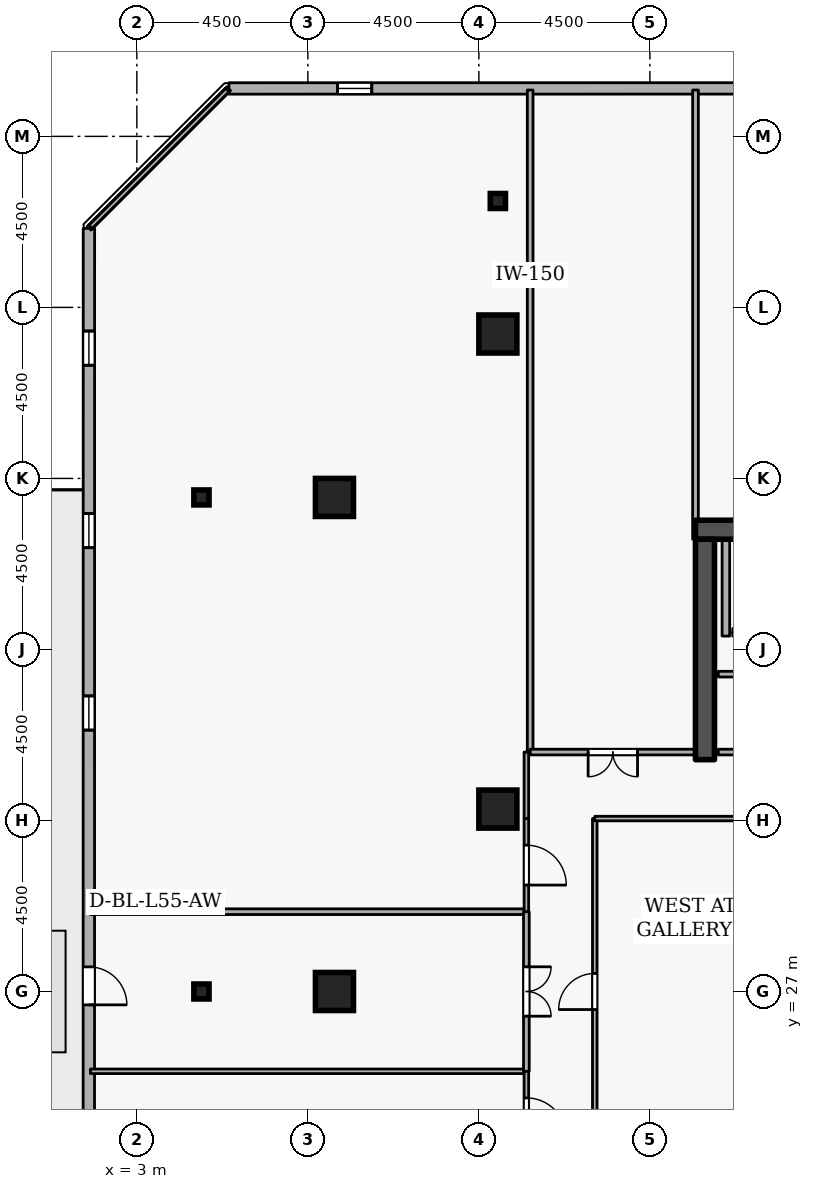
"""IFC4 building model, lengths in metres.
Left out: names, types, materials, properties, quantities, classifications, styles, units other than length and angle.
Written with IfcOpenShell. Run it as: python <this file> out.ifc"""

import sys

from ifc_helpers import new_model, si_unit, direction, frame, frame_2d, origin, origin_2d, place, context, subcontext, project, spatial, rectangle, i_section, extrude, element, fill, save


model = new_model("IFC4")
c1 = context("Model", 3, precision=1e-05, world=origin(), true_north=direction((0.0, 1.0)))
c2 = subcontext(c1, "Body", "Model", "MODEL_VIEW")
j1 = project(units=[si_unit("LENGTHUNIT", "METRE"), si_unit("PLANEANGLEUNIT", "RADIAN")], contexts=[c1])
p1 = place(None, origin())
s1 = spatial("IfcSite", under=j1, at=p1, CompositionType="ELEMENT")
p2 = place(p1, origin())
s2 = spatial("IfcBuilding", under=s1, at=p2, CompositionType="ELEMENT")
p3 = place(p2, frame((0.0, 0.0, 207.3)))
s3 = spatial("IfcBuildingStorey", under=s2, at=p3, CompositionType="ELEMENT", Elevation=207.3)
p4 = place(p3, frame((17.7, 39.15, 0.0), z_axis=(0.0, 0.0, 1.0), x_axis=(1.0, 0.0, 0.0)))
e1 = element("IfcWall", 1, at=p4, inside=s3, PredefinedType="SHEAR", context=c2, shape_type="SweptSolid", body=[
    extrude(rectangle(XDim=15.6, YDim=0.5, at=frame_2d((7.8, 0.0))), origin(), (0.0, 0.0, 1.0), 3.6),
])
p5 = place(p3, frame((17.95, 33.1, 0.0), z_axis=(0.0, 0.0, 1.0), x_axis=(0.0, 1.0, 0.0)))
e2 = element("IfcWall", 2, at=p5, inside=s3, PredefinedType="SHEAR", context=c2, shape_type="SweptSolid", body=[
    extrude(rectangle(XDim=5.8, YDim=0.5, at=frame_2d((2.9, 0.0))), origin(), (0.0, 0.0, 1.0), 3.6),
])
for number, where, z_axis, x_axis in (
    (3, (12.5, 44.3, 0.0), (0.0, 0.0, 1.0), (1.0, 0.0, 0.0)),
    (4, (8.2, 27.0, 0.0), (0.0, 0.0, 1.0), (1.0, 0.0, 0.0)),
    (5, (8.2, 40.0, 0.0), (0.0, 0.0, 1.0), (1.0, 0.0, 0.0)),
    (6, (12.5, 31.8, 0.0), (0.0, 0.0, 1.0), (1.0, 0.0, 0.0)),
):
    element("IfcColumn", number, at=place(p3, frame(where, z_axis=z_axis, x_axis=x_axis)), inside=s3, PredefinedType="COLUMN", context=c2, shape_type="SweptSolid", body=[
        extrude(rectangle(XDim=1.0, YDim=1.0, at=origin_2d()), origin(), (0.0, 0.0, 1.0), 3.6),
    ])
for number, where, z_axis, x_axis in (
    (7, (12.5, 47.8, 0.0), (0.0, 0.0, 1.0), (1.0, 0.0, 0.0)),
    (8, (4.7, 27.0, 0.0), (0.0, 0.0, 1.0), (1.0, 0.0, 0.0)),
    (9, (4.7, 40.0, 0.0), (0.0, 0.0, 1.0), (1.0, 0.0, 0.0)),
):
    element("IfcColumn", number, at=place(p3, frame(where, z_axis=z_axis, x_axis=x_axis)), inside=s3, PredefinedType="COLUMN", context=c2, shape_type="SweptSolid", body=[
        extrude(i_section(OverallWidth=0.399, OverallDepth=0.394, WebThickness=0.023, FlangeThickness=0.037, FilletRadius=0.015, at=origin_2d()), origin(), (0.0, 0.0, 1.0), 3.6),
    ])
p6 = place(p3, frame((40.681, 50.765, 0.0), z_axis=(0.0, 0.0, 1.0), x_axis=(-0.999999994606, -0.000103863011, 0.0)))
e10 = element("IfcWall", 10, at=p6, inside=s3, PredefinedType="STANDARD", context=c2, shape_type="SweptSolid", body=[
    extrude(rectangle(XDim=35.259, YDim=0.3, at=frame_2d((17.629, 0.0))), origin(), (0.0, 0.0, 1.0), 2.7),
])
p7 = place(p6, frame((2.7, 0.0, 0.72)))
e11 = element("IfcOpeningElement", 11, at=p7, cuts=e10, PredefinedType="OPENING", context=c2, shape_type="SweptSolid", body=[
    extrude(rectangle(XDim=0.9, YDim=1.75, at=frame_2d((0.45, 0.875))), frame((0.0, 0.16, 0.0), z_axis=(0.0, -1.0, 0.0), x_axis=(1.0, 0.0, 0.0)), (0.0, 0.0, 1.0), 0.32),
])
p8 = place(p6, frame((7.5, 0.0, 0.72)))
e12 = element("IfcOpeningElement", 12, at=p8, cuts=e10, PredefinedType="OPENING", context=c2, shape_type="SweptSolid", body=[
    extrude(rectangle(XDim=0.9, YDim=1.75, at=frame_2d((0.45, 0.875))), frame((0.0, 0.16, 0.0), z_axis=(0.0, -1.0, 0.0), x_axis=(1.0, 0.0, 0.0)), (0.0, 0.0, 1.0), 0.32),
])
p9 = place(p6, frame((12.3, 0.0, 0.72)))
e13 = element("IfcOpeningElement", 13, at=p9, cuts=e10, PredefinedType="OPENING", context=c2, shape_type="SweptSolid", body=[
    extrude(rectangle(XDim=0.9, YDim=1.75, at=frame_2d((0.45, 0.875))), frame((0.0, 0.16, 0.0), z_axis=(0.0, -1.0, 0.0), x_axis=(1.0, 0.0, 0.0)), (0.0, 0.0, 1.0), 0.32),
])
p10 = place(p6, frame((17.1, 0.0, 0.72)))
e14 = element("IfcOpeningElement", 14, at=p10, cuts=e10, PredefinedType="OPENING", context=c2, shape_type="SweptSolid", body=[
    extrude(rectangle(XDim=0.9, YDim=1.75, at=frame_2d((0.45, 0.875))), frame((0.0, 0.16, 0.0), z_axis=(0.0, -1.0, 0.0), x_axis=(1.0, 0.0, 0.0)), (0.0, 0.0, 1.0), 0.32),
])
p11 = place(p6, frame((31.5, 0.0, 0.72)))
e15 = element("IfcOpeningElement", 15, at=p11, cuts=e10, PredefinedType="OPENING", context=c2, shape_type="SweptSolid", body=[
    extrude(rectangle(XDim=0.9, YDim=1.75, at=frame_2d((0.45, 0.875))), frame((0.0, 0.16, 0.0), z_axis=(0.0, -1.0, 0.0), x_axis=(1.0, 0.0, 0.0)), (0.0, 0.0, 1.0), 0.32),
])
p12 = place(p3, frame((1.739, 47.078, 0.0), z_axis=(0.0, 0.0, 1.0), x_axis=(-0.000103863011, -0.999999994606, 0.0)))
e16 = element("IfcWall", 16, at=p12, inside=s3, PredefinedType="STANDARD", context=c2, shape_type="SweptSolid", body=[
    extrude(rectangle(XDim=35.259, YDim=0.3, at=frame_2d((17.629, 0.0))), origin(), (0.0, 0.0, 1.0), 2.7),
])
p13 = place(p12, frame((19.43, 0.0, 0.0)))
e17 = element("IfcOpeningElement", 17, at=p13, cuts=e16, PredefinedType="OPENING", context=c2, shape_type="SweptSolid", body=[
    extrude(rectangle(XDim=1.0, YDim=2.08, at=frame_2d((0.5, 1.04))), frame((0.0, 0.16, 0.0), z_axis=(0.0, -1.0, 0.0), x_axis=(1.0, 0.0, 0.0)), (0.0, 0.0, 1.0), 0.32),
])
p14 = place(p12, frame((2.7, 0.0, 0.72)))
e18 = element("IfcOpeningElement", 18, at=p14, cuts=e16, PredefinedType="OPENING", context=c2, shape_type="SweptSolid", body=[
    extrude(rectangle(XDim=0.9, YDim=1.75, at=frame_2d((0.45, 0.875))), frame((0.0, 0.16, 0.0), z_axis=(0.0, -1.0, 0.0), x_axis=(1.0, 0.0, 0.0)), (0.0, 0.0, 1.0), 0.32),
])
p15 = place(p12, frame((7.5, 0.0, 0.72)))
e19 = element("IfcOpeningElement", 19, at=p15, cuts=e16, PredefinedType="OPENING", context=c2, shape_type="SweptSolid", body=[
    extrude(rectangle(XDim=0.9, YDim=1.75, at=frame_2d((0.45, 0.875))), frame((0.0, 0.16, 0.0), z_axis=(0.0, -1.0, 0.0), x_axis=(1.0, 0.0, 0.0)), (0.0, 0.0, 1.0), 0.32),
])
p16 = place(p12, frame((12.3, 0.0, 0.72)))
e20 = element("IfcOpeningElement", 20, at=p16, cuts=e16, PredefinedType="OPENING", context=c2, shape_type="SweptSolid", body=[
    extrude(rectangle(XDim=0.9, YDim=1.75, at=frame_2d((0.45, 0.875))), frame((0.0, 0.16, 0.0), z_axis=(0.0, -1.0, 0.0), x_axis=(1.0, 0.0, 0.0)), (0.0, 0.0, 1.0), 0.32),
])
p17 = place(p12, frame((26.7, 0.0, 0.72)))
e21 = element("IfcOpeningElement", 21, at=p17, cuts=e16, PredefinedType="OPENING", context=c2, shape_type="SweptSolid", body=[
    extrude(rectangle(XDim=0.9, YDim=1.75, at=frame_2d((0.45, 0.875))), frame((0.0, 0.16, 0.0), z_axis=(0.0, -1.0, 0.0), x_axis=(1.0, 0.0, 0.0)), (0.0, 0.0, 1.0), 0.32),
])
p18 = place(p12, frame((31.5, 0.0, 0.72)))
e22 = element("IfcOpeningElement", 22, at=p18, cuts=e16, PredefinedType="OPENING", context=c2, shape_type="SweptSolid", body=[
    extrude(rectangle(XDim=0.9, YDim=1.75, at=frame_2d((0.45, 0.875))), frame((0.0, 0.16, 0.0), z_axis=(0.0, -1.0, 0.0), x_axis=(1.0, 0.0, 0.0)), (0.0, 0.0, 1.0), 0.32),
])
p19 = place(p3, frame((20.62, 36.45, 0.0), z_axis=(0.0, 0.0, 1.0), x_axis=(-1.0, 0.0, 0.0)))
e23 = element("IfcWall", 23, at=p19, inside=s3, PredefinedType="STANDARD", context=c2, shape_type="SweptSolid", body=[
    extrude(rectangle(XDim=1.94, YDim=0.2, at=frame_2d((0.97, 0.0))), origin(), (0.0, 0.0, 1.0), 3.34),
])
p20 = place(p19, frame((0.46, 0.0, 0.0)))
e24 = element("IfcOpeningElement", 24, at=p20, cuts=e23, PredefinedType="OPENING", context=c2, shape_type="SweptSolid", body=[
    extrude(rectangle(XDim=1.02, YDim=2.06, at=frame_2d((0.51, 1.03))), frame((0.0, 0.11, 0.0), z_axis=(0.0, -1.0, 0.0), x_axis=(1.0, 0.0, 0.0)), (0.0, 0.0, 1.0), 0.22),
])
p21 = place(p3, frame((18.5, 36.352, 0.0), z_axis=(0.0, 0.0, 1.0), x_axis=(0.0, 1.0, 0.0)))
e25 = element("IfcWall", 25, at=p21, inside=s3, PredefinedType="STANDARD", context=c2, shape_type="SweptSolid", body=[
    extrude(rectangle(XDim=2.536, YDim=0.2, at=frame_2d((1.268, 0.0))), origin(), (0.0, 0.0, 1.0), 3.34),
])
p22 = place(p3, frame((18.3, 35.35, 0.0), z_axis=(0.0, 0.0, 1.0), x_axis=(1.0, 0.0, 0.0)))
e26 = element("IfcWall", 26, at=p22, inside=s3, PredefinedType="PARTITIONING", context=c2, shape_type="SweptSolid", body=[
    extrude(rectangle(XDim=4.25, YDim=0.15, at=frame_2d((2.125, 0.0))), origin(), (0.0, 0.0, 1.0), 3.34),
])
p23 = place(p3, frame((22.55, 33.3, 0.0), z_axis=(0.0, 0.0, 1.0), x_axis=(-1.0, 0.0, 0.0)))
e27 = element("IfcWall", 27, at=p23, inside=s3, PredefinedType="PARTITIONING", context=c2, shape_type="SweptSolid", body=[
    extrude(rectangle(XDim=4.25, YDim=0.15, at=frame_2d((2.125, 0.0))), origin(), (0.0, 0.0, 1.0), 3.34),
])
p24 = place(p23, frame((1.665, 0.0, 0.0)))
e28 = element("IfcOpeningElement", 28, at=p24, cuts=e27, PredefinedType="OPENING", context=c2, shape_type="SweptSolid", body=[
    extrude(rectangle(XDim=0.92, YDim=2.08, at=frame_2d((0.46, 1.04))), frame((0.0, 0.085, 0.0), z_axis=(0.0, -1.0, 0.0), x_axis=(1.0, 0.0, 0.0)), (0.0, 0.0, 1.0), 0.17),
])
p25 = place(p3, frame((13.35, 33.3, 0.0), z_axis=(0.0, 0.0, 1.0), x_axis=(0.0, 1.0, 0.0)))
e29 = element("IfcWall", 29, at=p25, inside=s3, PredefinedType="PARTITIONING", context=c2, shape_type="SweptSolid", body=[
    extrude(rectangle(XDim=17.42, YDim=0.15, at=frame_2d((8.71, 0.0))), origin(), (0.0, 0.0, 1.0), 3.34),
])
p26 = place(p3, frame((17.7, 50.72, 0.0), z_axis=(0.0, 0.0, 1.0), x_axis=(0.0, -1.0, 0.0)))
e30 = element("IfcWall", 30, at=p26, inside=s3, PredefinedType="PARTITIONING", context=c2, shape_type="SweptSolid", body=[
    extrude(rectangle(XDim=11.82, YDim=0.15, at=frame_2d((5.91, 0.0))), origin(), (0.0, 0.0, 1.0), 2.545),
])
p27 = place(p3, frame((17.7, 33.3, 0.0), z_axis=(0.0, 0.0, 1.0), x_axis=(-1.0, 0.0, 0.0)))
e31 = element("IfcWall", 31, at=p27, inside=s3, PredefinedType="PARTITIONING", context=c2, shape_type="SweptSolid", body=[
    extrude(rectangle(XDim=4.35, YDim=0.15, at=frame_2d((2.175, 0.0))), origin(), (0.0, 0.0, 1.0), 3.34),
])
p28 = place(p27, frame((1.525, 0.0, 0.0)))
e32 = element("IfcOpeningElement", 32, at=p28, cuts=e31, PredefinedType="OPENING", context=c2, shape_type="SweptSolid", body=[
    extrude(rectangle(XDim=1.3, YDim=2.12, at=frame_2d((0.65, 1.06))), frame((0.0, 0.085, 0.0), z_axis=(0.0, -1.0, 0.0), x_axis=(1.0, 0.0, 0.0)), (0.0, 0.0, 1.0), 0.17),
])
p29 = place(p3, frame((1.78, 24.9, 0.0), z_axis=(0.0, 0.0, 1.0), x_axis=(1.0, 0.0, 0.0)))
e33 = element("IfcWall", 33, at=p29, inside=s3, PredefinedType="PARTITIONING", context=c2, shape_type="SweptSolid", body=[
    extrude(rectangle(XDim=11.47, YDim=0.12, at=frame_2d((5.735, 0.0))), origin(), (0.0, 0.0, 1.0), 3.34),
])
p30 = place(p3, frame((13.25, 24.9, 0.0), z_axis=(0.0, 0.0, 1.0), x_axis=(0.0, -1.0, 0.0)))
e34 = element("IfcWall", 34, at=p30, inside=s3, PredefinedType="PARTITIONING", context=c2, shape_type="SweptSolid", body=[
    extrude(rectangle(XDim=2.45, YDim=0.12, at=frame_2d((1.225, 0.0))), origin(), (0.0, 0.0, 1.0), 3.34),
])
p31 = place(p30, frame((0.7, 0.0, 0.0)))
e35 = element("IfcOpeningElement", 35, at=p31, cuts=e34, PredefinedType="OPENING", context=c2, shape_type="SweptSolid", body=[
    extrude(rectangle(XDim=1.05, YDim=2.1, at=frame_2d((0.525, 1.05))), frame((0.0, 0.07, 0.0), z_axis=(0.0, -1.0, 0.0), x_axis=(1.0, 0.0, 0.0)), (0.0, 0.0, 1.0), 0.14),
])
p32 = place(p3, frame((1.78, 29.1, 0.0), z_axis=(0.0, 0.0, 1.0), x_axis=(1.0, 0.0, 0.0)))
e36 = element("IfcWall", 36, at=p32, inside=s3, PredefinedType="PARTITIONING", context=c2, shape_type="SweptSolid", body=[
    extrude(rectangle(XDim=11.47, YDim=0.15, at=frame_2d((5.735, 0.0))), origin(), (0.0, 0.0, 1.0), 3.34),
])
p33 = place(p3, frame((13.25, 29.1, 0.0), z_axis=(0.0, 0.0, 1.0), x_axis=(0.0, -1.0, 0.0)))
e37 = element("IfcWall", 37, at=p33, inside=s3, PredefinedType="PARTITIONING", context=c2, shape_type="SweptSolid", body=[
    extrude(rectangle(XDim=4.2, YDim=0.15, at=frame_2d((2.1, 0.0))), origin(), (0.0, 0.0, 1.0), 3.34),
])
p34 = place(p33, frame((1.45, 0.0, 0.0)))
e38 = element("IfcOpeningElement", 38, at=p34, cuts=e37, PredefinedType="OPENING", context=c2, shape_type="SweptSolid", body=[
    extrude(rectangle(XDim=1.3, YDim=2.12, at=frame_2d((0.65, 1.06))), frame((0.0, 0.085, 0.0), z_axis=(0.0, -1.0, 0.0), x_axis=(1.0, 0.0, 0.0)), (0.0, 0.0, 1.0), 0.17),
])
p35 = place(p3, frame((1.78, 47.117, 0.0), z_axis=(0.0, 0.0, 1.0), x_axis=(0.707106781187, 0.707106781187, 0.0)))
e39 = element("IfcWall", 39, at=p35, inside=s3, PredefinedType="PARTITIONING", context=c2, shape_type="SweptSolid", body=[
    extrude(rectangle(XDim=5.095, YDim=0.12, at=frame_2d((2.547, 0.0))), origin(), (0.0, 0.0, 1.0), 3.34),
])
p36 = place(p3, frame((13.25, 33.3, 0.0), z_axis=(0.0, 0.0, 1.0), x_axis=(0.0, -1.0, 0.0)))
e40 = element("IfcWall", 40, at=p36, inside=s3, PredefinedType="PARTITIONING", context=c2, shape_type="SweptSolid", body=[
    extrude(rectangle(XDim=1.75, YDim=0.12, at=frame_2d((0.875, 0.0))), origin(), (0.0, 0.0, 1.0), 3.34),
])
p37 = place(p3, frame((13.25, 31.55, 0.0), z_axis=(0.0, 0.0, 1.0), x_axis=(0.0, -1.0, 0.0)))
e41 = element("IfcWall", 41, at=p37, inside=s3, PredefinedType="PARTITIONING", context=c2, shape_type="SweptSolid", body=[
    extrude(rectangle(XDim=2.45, YDim=0.12, at=frame_2d((1.225, 0.0))), origin(), (0.0, 0.0, 1.0), 3.34),
])
p38 = place(p37, frame((0.7, 0.0, 0.0)))
e42 = element("IfcOpeningElement", 42, at=p38, cuts=e41, PredefinedType="OPENING", context=c2, shape_type="SweptSolid", body=[
    extrude(rectangle(XDim=1.05, YDim=2.1, at=frame_2d((0.525, 1.05))), frame((0.0, 0.07, 0.0), z_axis=(0.0, -1.0, 0.0), x_axis=(1.0, 0.0, 0.0)), (0.0, 0.0, 1.0), 0.14),
])
p39 = place(p3, frame((15.05, 22.45, 0.0), z_axis=(0.0, 0.0, 1.0), x_axis=(0.0, 1.0, 0.0)))
e43 = element("IfcWall", 43, at=p39, inside=s3, PredefinedType="PARTITIONING", context=c2, shape_type="SweptSolid", body=[
    extrude(rectangle(XDim=9.1, YDim=0.12, at=frame_2d((4.55, 0.0))), origin(), (0.0, 0.0, 1.0), 3.34),
])
p40 = place(p39, frame((4.075, 0.0, 0.0)))
e44 = element("IfcOpeningElement", 44, at=p40, cuts=e43, PredefinedType="OPENING", context=c2, shape_type="SweptSolid", body=[
    extrude(rectangle(XDim=0.95, YDim=2.1, at=frame_2d((0.475, 1.05))), frame((0.0, 0.07, 0.0), z_axis=(0.0, -1.0, 0.0), x_axis=(1.0, 0.0, 0.0)), (0.0, 0.0, 1.0), 0.14),
])
p41 = place(p3, frame((15.05, 31.55, 0.0), z_axis=(0.0, 0.0, 1.0), x_axis=(1.0, 0.0, 0.0)))
e45 = element("IfcWall", 45, at=p41, inside=s3, PredefinedType="PARTITIONING", context=c2, shape_type="SweptSolid", body=[
    extrude(rectangle(XDim=5.85, YDim=0.12, at=frame_2d((2.925, 0.0))), origin(), (0.0, 0.0, 1.0), 3.34),
])
p42 = place(p11, origin())
e46 = element("IfcWindow", 46, at=p42, inside=s3, PartitioningType="SINGLE_PANEL", PredefinedType="WINDOW", context=c2, shape_type="SweptSolid", body=[
    extrude(rectangle(XDim=0.9, YDim=1.75, at=frame_2d((0.45, 0.875))), frame((0.0, 0.03, 0.0), z_axis=(0.0, -1.0, 0.0), x_axis=(1.0, 0.0, 0.0)), (0.0, 0.0, 1.0), 0.06),
])
fill(e15, e46)
p43 = place(p13, origin())
e47 = element("IfcDoor", 47, at=p43, inside=s3, OperationType="SINGLE_SWING_RIGHT", PredefinedType="DOOR", context=c2, shape_type="SweptSolid", body=[
    extrude(rectangle(XDim=1.0, YDim=2.08, at=frame_2d((0.5, 1.04))), frame((0.0, 0.025, 0.0), z_axis=(0.0, -1.0, 0.0), x_axis=(1.0, 0.0, 0.0)), (0.0, 0.0, 1.0), 0.05),
])
fill(e17, e47)
p44 = place(p14, origin())
e48 = element("IfcWindow", 48, at=p44, inside=s3, PartitioningType="SINGLE_PANEL", PredefinedType="WINDOW", context=c2, shape_type="SweptSolid", body=[
    extrude(rectangle(XDim=0.9, YDim=1.75, at=frame_2d((0.45, 0.875))), frame((0.0, 0.03, 0.0), z_axis=(0.0, -1.0, 0.0), x_axis=(1.0, 0.0, 0.0)), (0.0, 0.0, 1.0), 0.06),
])
fill(e18, e48)
p45 = place(p15, origin())
e49 = element("IfcWindow", 49, at=p45, inside=s3, PartitioningType="SINGLE_PANEL", PredefinedType="WINDOW", context=c2, shape_type="SweptSolid", body=[
    extrude(rectangle(XDim=0.9, YDim=1.75, at=frame_2d((0.45, 0.875))), frame((0.0, 0.03, 0.0), z_axis=(0.0, -1.0, 0.0), x_axis=(1.0, 0.0, 0.0)), (0.0, 0.0, 1.0), 0.06),
])
fill(e19, e49)
p46 = place(p16, origin())
e50 = element("IfcWindow", 50, at=p46, inside=s3, PartitioningType="SINGLE_PANEL", PredefinedType="WINDOW", context=c2, shape_type="SweptSolid", body=[
    extrude(rectangle(XDim=0.9, YDim=1.75, at=frame_2d((0.45, 0.875))), frame((0.0, 0.03, 0.0), z_axis=(0.0, -1.0, 0.0), x_axis=(1.0, 0.0, 0.0)), (0.0, 0.0, 1.0), 0.06),
])
fill(e20, e50)
p47 = place(p28, origin())
e51 = element("IfcDoor", 51, at=p47, inside=s3, OperationType="DOUBLE_DOOR_SINGLE_SWING", PredefinedType="DOOR", context=c2, shape_type="SweptSolid", body=[
    extrude(rectangle(XDim=1.3, YDim=2.12, at=frame_2d((0.65, 1.06))), frame((0.0, 0.025, 0.0), z_axis=(0.0, -1.0, 0.0), x_axis=(1.0, 0.0, 0.0)), (0.0, 0.0, 1.0), 0.05),
])
fill(e32, e51)
p48 = place(p31, origin())
e52 = element("IfcDoor", 52, at=p48, inside=s3, OperationType="SINGLE_SWING_RIGHT", PredefinedType="DOOR", context=c2, shape_type="SweptSolid", body=[
    extrude(rectangle(XDim=1.05, YDim=2.1, at=frame_2d((0.525, 1.05))), frame((0.0, 0.025, 0.0), z_axis=(0.0, -1.0, 0.0), x_axis=(1.0, 0.0, 0.0)), (0.0, 0.0, 1.0), 0.05),
])
fill(e35, e52)
p49 = place(p34, origin())
e53 = element("IfcDoor", 53, at=p49, inside=s3, OperationType="DOUBLE_DOOR_SINGLE_SWING", PredefinedType="DOOR", context=c2, shape_type="SweptSolid", body=[
    extrude(rectangle(XDim=1.3, YDim=2.12, at=frame_2d((0.65, 1.06))), frame((0.0, 0.025, 0.0), z_axis=(0.0, -1.0, 0.0), x_axis=(1.0, 0.0, 0.0)), (0.0, 0.0, 1.0), 0.05),
])
fill(e38, e53)
p50 = place(p38, origin())
e54 = element("IfcDoor", 54, at=p50, inside=s3, OperationType="SINGLE_SWING_RIGHT", PredefinedType="DOOR", context=c2, shape_type="SweptSolid", body=[
    extrude(rectangle(XDim=1.05, YDim=2.1, at=frame_2d((0.525, 1.05))), frame((0.0, 0.025, 0.0), z_axis=(0.0, -1.0, 0.0), x_axis=(1.0, 0.0, 0.0)), (0.0, 0.0, 1.0), 0.05),
])
fill(e42, e54)
p51 = place(p40, origin())
e55 = element("IfcDoor", 55, at=p51, inside=s3, OperationType="SINGLE_SWING_LEFT", PredefinedType="DOOR", context=c2, shape_type="SweptSolid", body=[
    extrude(rectangle(XDim=0.95, YDim=2.1, at=frame_2d((0.475, 1.05))), frame((0.0, 0.025, 0.0), z_axis=(0.0, -1.0, 0.0), x_axis=(1.0, 0.0, 0.0)), (0.0, 0.0, 1.0), 0.05),
])
fill(e44, e55)
save(model, sys.argv[1])
